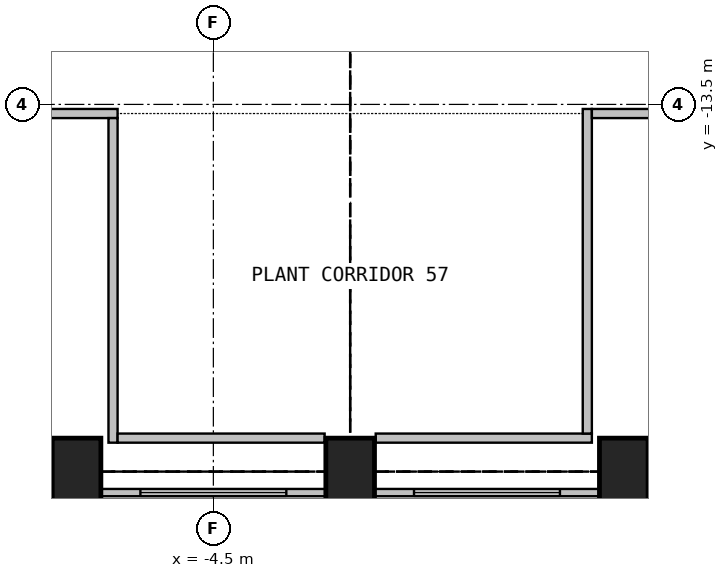
"""IFC4 building model, lengths in metres.
Left out: names, types, materials, properties, quantities, classifications, styles, units other than length and angle.
Written with IfcOpenShell. Run it as: python <this file> out.ifc"""

import sys

from ifc_helpers import new_model, si_unit, direction, frame, frame_2d, origin, origin_2d, place, context, subcontext, project, spatial, rectangle, extrude, element, fill, save


model = new_model("IFC4")
c1 = context("Model", 3, precision=1e-05, world=origin(), true_north=direction((0.0, 1.0)))
c2 = subcontext(c1, "Body", "Model", "MODEL_VIEW")
j1 = project(units=[si_unit("LENGTHUNIT", "METRE"), si_unit("PLANEANGLEUNIT", "RADIAN")], contexts=[c1])
p1 = place(None, origin())
s1 = spatial("IfcSite", under=j1, at=p1, CompositionType="ELEMENT")
p2 = place(p1, origin())
s2 = spatial("IfcBuilding", under=s1, at=p2, CompositionType="ELEMENT")
p3 = place(p2, frame((0.0, 0.0, 230.7)))
s3 = spatial("IfcBuildingStorey", under=s2, at=p3, CompositionType="ELEMENT", Elevation=230.7)
for number, where, z_axis, x_axis in (
    (1, (-6.75, -19.539, 0.0), (0.0, 0.0, 1.0), (1.0, 0.0, 0.0)),
    (2, (-2.25, -19.539, 0.0), (0.0, 0.0, 1.0), (1.0, 0.0, 0.0)),
    (3, (2.25, -19.539, 0.0), (0.0, 0.0, 1.0), (1.0, 0.0, 0.0)),
):
    element("IfcColumn", number, at=place(p3, frame(where, z_axis=z_axis, x_axis=x_axis)), inside=s3, PredefinedType="COLUMN", context=c2, shape_type="SweptSolid", body=[
        extrude(rectangle(XDim=0.8, YDim=1.1, at=origin_2d()), origin(), (0.0, 0.0, 1.0), 4.175),
    ])
p4 = place(p3, frame((-6.35, -19.884, 0.0), z_axis=(0.0, 0.0, 1.0), x_axis=(1.0, 0.0, 0.0)))
e4 = element("IfcWall", 4, at=p4, inside=s3, PredefinedType="SOLIDWALL", context=c2, shape_type="SweptSolid", body=[
    extrude(rectangle(XDim=3.699, YDim=0.12, at=frame_2d((1.85, 0.0))), origin(), (0.0, 0.0, 1.0), 4.175),
])
p5 = place(p4, frame((0.649, 0.0, 0.6)))
e5 = element("IfcOpeningElement", 5, at=p5, cuts=e4, PredefinedType="OPENING", context=c2, shape_type="SweptSolid", body=[
    extrude(rectangle(XDim=2.4, YDim=3.0, at=frame_2d((1.2, 1.5))), frame((0.0, 0.07, 0.0), z_axis=(0.0, -1.0, 0.0), x_axis=(1.0, 0.0, 0.0)), (0.0, 0.0, 1.0), 0.14),
])
p6 = place(p3, frame((-1.85, -19.884, 0.0), z_axis=(0.0, 0.0, 1.0), x_axis=(1.0, 0.0, 0.0)))
e6 = element("IfcWall", 6, at=p6, inside=s3, PredefinedType="SOLIDWALL", context=c2, shape_type="SweptSolid", body=[
    extrude(rectangle(XDim=3.699, YDim=0.12, at=frame_2d((1.85, 0.0))), origin(), (0.0, 0.0, 1.0), 4.175),
])
p7 = place(p6, frame((0.649, 0.0, 0.6)))
e7 = element("IfcOpeningElement", 7, at=p7, cuts=e6, PredefinedType="OPENING", context=c2, shape_type="SweptSolid", body=[
    extrude(rectangle(XDim=2.4, YDim=3.0, at=frame_2d((1.2, 1.5))), frame((0.0, 0.07, 0.0), z_axis=(0.0, -1.0, 0.0), x_axis=(1.0, 0.0, 0.0)), (0.0, 0.0, 1.0), 0.14),
])
p8 = place(p3, frame((-15.825, -13.65, 0.0), z_axis=(0.0, 0.0, 1.0), x_axis=(1.0, 0.0, 0.0)))
e8 = element("IfcWall", 8, at=p8, inside=s3, PredefinedType="PARTITIONING", context=c2, shape_type="SweptSolid", body=[
    extrude(rectangle(XDim=9.75, YDim=0.15, at=frame_2d((4.875, 0.0))), origin(), (0.0, 0.0, 1.0), 4.175),
])
p9 = place(p3, frame((-6.15, -19.063, 0.0), z_axis=(0.0, 0.0, 1.0), x_axis=(0.0, 1.0, 0.0)))
e9 = element("IfcWall", 9, at=p9, inside=s3, PredefinedType="PARTITIONING", context=c2, shape_type="SweptSolid", body=[
    extrude(rectangle(XDim=5.338, YDim=0.15, at=frame_2d((2.669, 0.0))), origin(), (0.0, 0.0, 1.0), 4.175),
])
p10 = place(p3, frame((1.725, -18.988, 0.0), z_axis=(0.0, 0.0, 1.0), x_axis=(-1.0, 0.0, 0.0)))
e10 = element("IfcWall", 10, at=p10, inside=s3, PredefinedType="PARTITIONING", context=c2, shape_type="SweptSolid", body=[
    extrude(rectangle(XDim=3.555, YDim=0.15, at=frame_2d((1.778, 0.0))), origin(), (0.0, 0.0, 1.0), 4.175),
])
p11 = place(p3, frame((-2.67, -18.988, 0.0), z_axis=(0.0, 0.0, 1.0), x_axis=(-1.0, 0.0, 0.0)))
e11 = element("IfcWall", 11, at=p11, inside=s3, PredefinedType="PARTITIONING", context=c2, shape_type="SweptSolid", body=[
    extrude(rectangle(XDim=3.405, YDim=0.15, at=frame_2d((1.703, 0.0))), origin(), (0.0, 0.0, 1.0), 4.175),
])
p12 = place(p3, frame((1.65, -13.575, 0.0), z_axis=(0.0, 0.0, 1.0), x_axis=(0.0, -1.0, 0.0)))
e12 = element("IfcWall", 12, at=p12, inside=s3, PredefinedType="PARTITIONING", context=c2, shape_type="SweptSolid", body=[
    extrude(rectangle(XDim=5.338, YDim=0.15, at=frame_2d((2.669, 0.0))), origin(), (0.0, 0.0, 1.0), 4.175),
])
p13 = place(p3, frame((1.725, -13.65, 0.0), z_axis=(0.0, 0.0, 1.0), x_axis=(1.0, 0.0, 0.0)))
e13 = element("IfcWall", 13, at=p13, inside=s3, PredefinedType="PARTITIONING", context=c2, shape_type="SweptSolid", body=[
    extrude(rectangle(XDim=14.25, YDim=0.15, at=frame_2d((7.125, 0.0))), origin(), (0.0, 0.0, 1.0), 4.175),
])
p14 = place(p13, frame((6.625, 0.0, 0.0)))
e14 = element("IfcOpeningElement", 14, at=p14, cuts=e13, PredefinedType="OPENING", context=c2, shape_type="SweptSolid", body=[
    extrude(rectangle(XDim=1.0, YDim=2.1, at=frame_2d((0.5, 1.05))), frame((0.0, 0.085, 0.0), z_axis=(0.0, -1.0, 0.0), x_axis=(1.0, 0.0, 0.0)), (0.0, 0.0, 1.0), 0.17),
])
p15 = place(p5, origin())
e15 = element("IfcWindow", 15, at=p15, inside=s3, PartitioningType="SINGLE_PANEL", PredefinedType="WINDOW", context=c2, shape_type="SweptSolid", body=[
    extrude(rectangle(XDim=2.4, YDim=3.0, at=frame_2d((1.2, 1.5))), frame((0.0, 0.06, 0.0), z_axis=(0.0, -1.0, 0.0), x_axis=(1.0, 0.0, 0.0)), (0.0, 0.0, 1.0), 0.02),
])
fill(e5, e15)
p16 = place(p7, origin())
e16 = element("IfcWindow", 16, at=p16, inside=s3, PartitioningType="SINGLE_PANEL", PredefinedType="WINDOW", context=c2, shape_type="SweptSolid", body=[
    extrude(rectangle(XDim=2.4, YDim=3.0, at=frame_2d((1.2, 1.5))), frame((0.0, 0.06, 0.0), z_axis=(0.0, -1.0, 0.0), x_axis=(1.0, 0.0, 0.0)), (0.0, 0.0, 1.0), 0.02),
])
fill(e7, e16)
save(model, sys.argv[1])
